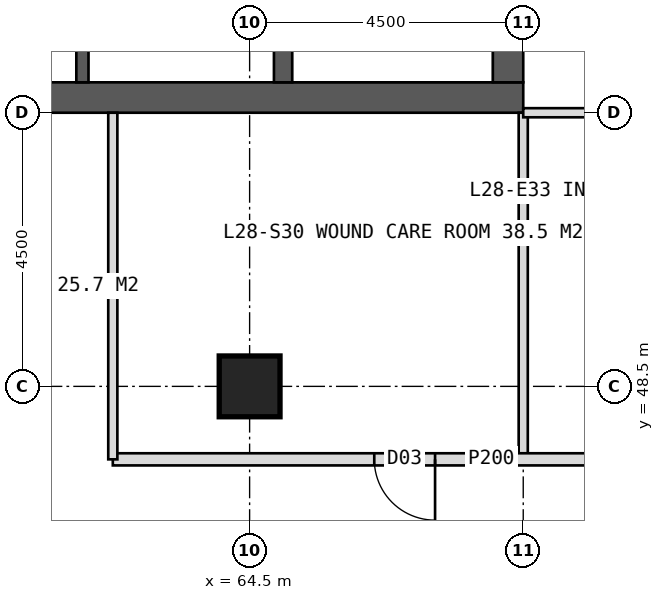
"""IFC4 building model, lengths in metres.
Left out: names, types, materials, properties, quantities, classifications, styles, units other than length and angle.
Written with IfcOpenShell. Run it as: python <this file> out.ifc"""

import sys

from ifc_helpers import new_model, si_unit, direction, frame, frame_2d, origin, origin_2d, place, context, subcontext, project, spatial, rectangle, hollow_rectangle, extrude, element, fill, save


model = new_model("IFC4")
c1 = context("Model", 3, precision=1e-05, world=origin(), true_north=direction((0.0, 1.0)))
c2 = subcontext(c1, "Body", "Model", "MODEL_VIEW")
j1 = project(units=[si_unit("LENGTHUNIT", "METRE"), si_unit("PLANEANGLEUNIT", "RADIAN")], contexts=[c1])
p1 = place(None, origin())
s1 = spatial("IfcSite", under=j1, at=p1, CompositionType="ELEMENT")
p2 = place(p1, origin())
s2 = spatial("IfcBuilding", under=s1, at=p2, CompositionType="ELEMENT")
p3 = place(p2, frame((0.0, 0.0, 120.0)))
s3 = spatial("IfcBuildingStorey", under=s2, at=p3, CompositionType="ELEMENT", Elevation=120.0)
p4 = place(p3, frame((51.0, 53.25, 0.0), z_axis=(0.0, 0.0, 1.0), x_axis=(1.0, 0.0, 0.0)))
e1 = element("IfcWall", 1, at=p4, inside=s3, PredefinedType="SHEAR", context=c2, shape_type="SweptSolid", body=[
    extrude(rectangle(XDim=18.0, YDim=0.5, at=frame_2d((9.0, 0.0))), origin(), (0.0, 0.0, 1.0), 4.0),
])
p5 = place(p4, frame((8.1, 0.0, 0.0)))
e2 = element("IfcOpeningElement", 2, at=p5, cuts=e1, PredefinedType="OPENING", context=c2, shape_type="SweptSolid", body=[
    extrude(rectangle(XDim=1.8, YDim=2.2, at=frame_2d((0.9, 1.1))), frame((0.0, 0.26, 0.0), z_axis=(0.0, -1.0, 0.0), x_axis=(1.0, 0.0, 0.0)), (0.0, 0.0, 1.0), 0.52),
])
p6 = place(p3, frame((68.75, 53.5, 0.0), z_axis=(0.0, 0.0, 1.0), x_axis=(0.0, 1.0, 0.0)))
e3 = element("IfcWall", 3, at=p6, inside=s3, PredefinedType="SHEAR", context=c2, shape_type="SweptSolid", body=[
    extrude(rectangle(XDim=17.0, YDim=0.5, at=frame_2d((8.5, 0.0))), origin(), (0.0, 0.0, 1.0), 4.0),
])
p7 = place(p6, frame((9.5, 0.0, 0.0)))
e4 = element("IfcOpeningElement", 4, at=p7, cuts=e3, PredefinedType="OPENING", context=c2, shape_type="SweptSolid", body=[
    extrude(rectangle(XDim=1.5, YDim=2.2, at=frame_2d((0.75, 1.1))), frame((0.0, 0.26, 0.0), z_axis=(0.0, -1.0, 0.0), x_axis=(1.0, 0.0, 0.0)), (0.0, 0.0, 1.0), 0.52),
])
p8 = place(p3, frame((65.05, 53.5, 0.0), z_axis=(0.0, 0.0, 1.0), x_axis=(0.0, 1.0, 0.0)))
e5 = element("IfcWall", 5, at=p8, inside=s3, PredefinedType="SHEAR", context=c2, shape_type="SweptSolid", body=[
    extrude(rectangle(XDim=17.0, YDim=0.3, at=frame_2d((8.5, 0.0))), origin(), (0.0, 0.0, 1.0), 4.0),
])
p9 = place(p3, frame((61.75, 53.5, 0.0), z_axis=(0.0, 0.0, 1.0), x_axis=(0.0, 1.0, 0.0)))
e6 = element("IfcWall", 6, at=p9, inside=s3, PredefinedType="SHEAR", context=c2, shape_type="SweptSolid", body=[
    extrude(rectangle(XDim=17.0, YDim=0.2, at=frame_2d((8.5, 0.0))), origin(), (0.0, 0.0, 1.0), 4.0),
])
p10 = place(p9, frame((1.375, 0.0, 0.0)))
e7 = element("IfcOpeningElement", 7, at=p10, cuts=e6, PredefinedType="OPENING", context=c2, shape_type="SweptSolid", body=[
    extrude(rectangle(XDim=1.4, YDim=2.2, at=frame_2d((0.7, 1.1))), frame((0.0, 0.11, 0.0), z_axis=(0.0, -1.0, 0.0), x_axis=(1.0, 0.0, 0.0)), (0.0, 0.0, 1.0), 0.22),
])
p11 = place(p9, frame((5.675, 0.0, 0.0)))
e8 = element("IfcOpeningElement", 8, at=p11, cuts=e6, PredefinedType="OPENING", context=c2, shape_type="SweptSolid", body=[
    extrude(rectangle(XDim=1.4, YDim=2.2, at=frame_2d((0.7, 1.1))), frame((0.0, 0.11, 0.0), z_axis=(0.0, -1.0, 0.0), x_axis=(1.0, 0.0, 0.0)), (0.0, 0.0, 1.0), 0.22),
])
p12 = place(p3, frame((64.5, 48.5, 0.0), z_axis=(0.0, 0.0, 1.0), x_axis=(1.0, 0.0, 0.0)))
e9 = element("IfcColumn", 9, at=p12, inside=s3, PredefinedType="COLUMN", context=c2, shape_type="SweptSolid", body=[
    extrude(hollow_rectangle(XDim=1.0, YDim=1.0, WallThickness=0.1, at=origin_2d()), origin(), (0.0, 0.0, 1.0), 4.0),
])
p13 = place(p3, frame((69.0, 53.0, 0.0), z_axis=(0.0, 0.0, 1.0), x_axis=(0.0, -1.0, 0.0)))
e10 = element("IfcWall", 10, at=p13, inside=s3, PredefinedType="PARTITIONING", context=c2, shape_type="SweptSolid", body=[
    extrude(rectangle(XDim=5.7, YDim=0.15, at=frame_2d((2.85, 0.0))), origin(), (0.0, 0.0, 1.0), 3.75),
])
p14 = place(p3, frame((74.7, 47.3, 0.0), z_axis=(0.0, 0.0, 1.0), x_axis=(-1.0, 0.0, 0.0)))
e11 = element("IfcWall", 11, at=p14, inside=s3, PredefinedType="PARTITIONING", context=c2, shape_type="SweptSolid", body=[
    extrude(rectangle(XDim=12.45, YDim=0.2, at=frame_2d((6.225, 0.0))), origin(), (0.0, 0.0, 1.0), 3.75),
])
p15 = place(p14, frame((7.15, 0.0, 0.0)))
e12 = element("IfcOpeningElement", 12, at=p15, cuts=e11, PredefinedType="OPENING", context=c2, shape_type="SweptSolid", body=[
    extrude(rectangle(XDim=1.0, YDim=2.1, at=frame_2d((0.5, 1.05))), frame((0.0, 0.11, 0.0), z_axis=(0.0, -1.0, 0.0), x_axis=(1.0, 0.0, 0.0)), (0.0, 0.0, 1.0), 0.22),
])
for number, where, z_axis, x_axis in (
    (13, (62.25, 53.0, 0.0), (0.0, 0.0, 1.0), (0.0, -1.0, 0.0)),
    (14, (69.0, 53.0, 0.0), (0.0, 0.0, 1.0), (1.0, 0.0, 0.0)),
):
    element("IfcWall", number, at=place(p3, frame(where, z_axis=z_axis, x_axis=x_axis)), inside=s3, PredefinedType="PARTITIONING", context=c2, shape_type="SweptSolid", body=[
        extrude(rectangle(XDim=5.7, YDim=0.15, at=frame_2d((2.85, 0.0))), origin(), (0.0, 0.0, 1.0), 3.75),
    ])
p16 = place(p15, origin())
e15 = element("IfcDoor", 15, at=p16, inside=s3, OperationType="SINGLE_SWING_LEFT", PredefinedType="DOOR", context=c2, shape_type="SweptSolid", body=[
    extrude(rectangle(XDim=1.0, YDim=2.1, at=frame_2d((0.5, 1.05))), frame((0.0, 0.025, 0.0), z_axis=(0.0, -1.0, 0.0), x_axis=(1.0, 0.0, 0.0)), (0.0, 0.0, 1.0), 0.05),
])
fill(e12, e15)
save(model, sys.argv[1])
